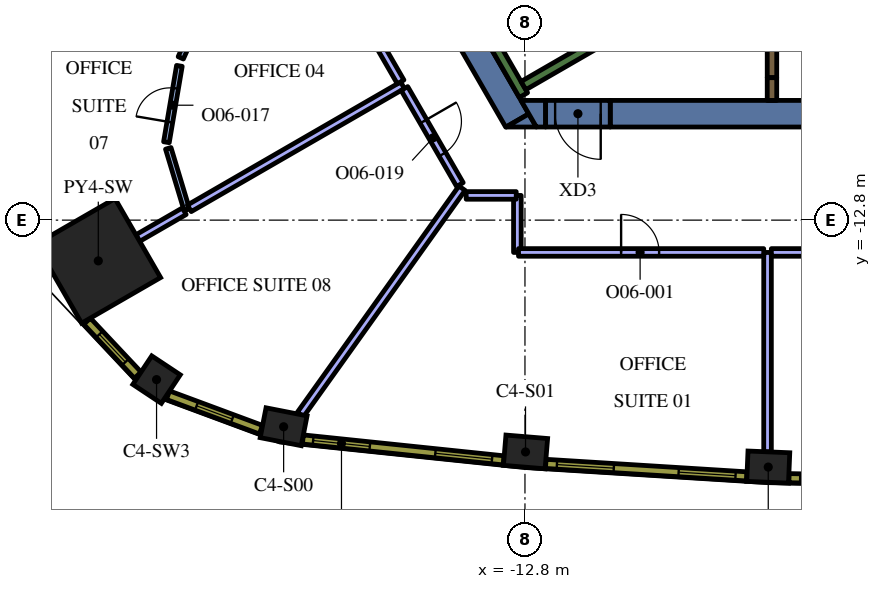
"""IFC4 building model, lengths in metres.
Left out: names, types, materials, properties, quantities, classifications, styles, units other than length and angle.
Written with IfcOpenShell. Run it as: python <this file> out.ifc"""

import sys

from ifc_helpers import new_model, si_unit, direction, frame, frame_2d, origin, origin_2d, place, context, subcontext, project, spatial, polyline, rectangle, outline, extrude, element, fill, save


model = new_model("IFC4")
c1 = context("Model", 3, precision=1e-05, world=origin(), true_north=direction((0.0, 1.0)))
c2 = subcontext(c1, "Body", "Model", "MODEL_VIEW")
j1 = project(units=[si_unit("LENGTHUNIT", "METRE"), si_unit("PLANEANGLEUNIT", "RADIAN")], contexts=[c1])
p1 = place(None, origin())
s1 = spatial("IfcSite", under=j1, at=p1, CompositionType="ELEMENT")
p2 = place(p1, origin())
s2 = spatial("IfcBuilding", under=s1, at=p2, CompositionType="ELEMENT")
p3 = place(p2, frame((0.0, 0.0, 205.8)))
s3 = spatial("IfcBuildingStorey", under=s2, at=p3, CompositionType="ELEMENT", Elevation=205.8)
p4 = place(p3, frame((-24.027, -13.872, 0.0), z_axis=(0.0, 0.0, 1.0), x_axis=(-0.866025403784, -0.5, 0.0)))
e1 = element("IfcColumn", 1, at=p4, inside=s3, PredefinedType="COLUMN", context=c2, shape_type="SweptSolid", body=[
    extrude(rectangle(XDim=2.4, YDim=2.4, at=origin_2d()), origin(), (0.0, 0.0, 1.0), 4.2),
])
for number, where, z_axis, x_axis in (
    (2, (-19.15, -18.237, 0.0), (0.0, 0.0, 1.0), (0.981, -0.192, 0.0)),
    (3, (-12.785, -18.9, 0.0), (0.0, 0.0, 1.0), (0.997, -0.083, 0.0)),
    (4, (-6.398, -19.298, 0.0), (0.0, 0.0, 1.0), (0.999, -0.041, 0.0)),
):
    element("IfcColumn", number, at=place(p3, frame(where, z_axis=z_axis, x_axis=x_axis)), inside=s3, PredefinedType="COLUMN", context=c2, shape_type="SweptSolid", body=[
        extrude(rectangle(XDim=1.1, YDim=0.8, at=origin_2d()), origin(), (0.0, 0.0, 1.0), 4.2),
    ])
p5 = place(p3, frame((-22.494, -16.997, 0.0), z_axis=(0.0, 0.0, 1.0), x_axis=(0.833238868178, -0.552913183563, 0.0)))
e5 = element("IfcColumn", 5, at=p5, inside=s3, PredefinedType="COLUMN", context=c2, shape_type="SweptSolid", body=[
    extrude(rectangle(XDim=0.9, YDim=0.9, at=origin_2d()), origin(), (0.0, 0.0, 1.0), 4.2),
])
p6 = place(p3, frame((-14.917, -6.863, 0.0), z_axis=(0.0, 0.0, 1.0), x_axis=(0.499972675833, -0.866041178825, 0.0)))
e6 = element("IfcWall", 6, at=p6, inside=s3, PredefinedType="SOLIDWALL", context=c2, shape_type="SweptSolid", body=[
    extrude(rectangle(XDim=3.829, YDim=0.7, at=frame_2d((1.915, 0.0))), origin(), (0.0, 0.0, 1.0), 4.2),
])
p7 = place(p3, origin())
e7 = element("IfcWall", 7, at=p7, inside=s3, PredefinedType="SOLIDWALL", context=c2, shape_type="SweptSolid", body=[
    extrude(outline(polyline([(-12.5, -10.35), (-13.296, -10.35), (-12.698, -10.005), (-12.5, -10.35)])), origin(), (0.0, 0.0, 1.0), 4.2),
])
e8 = element("IfcWall", 8, at=p7, inside=s3, PredefinedType="SOLIDWALL", context=c2, shape_type="SweptSolid", body=[
    extrude(outline(polyline([(-12.257, -10.35), (-12.5, -10.35), (-12.904, -9.65), (-12.257, -9.65), (-12.257, -10.35)])), origin(), (0.0, 0.0, 1.0), 4.2),
])
p8 = place(p3, frame((-10.556, -10.0, 0.0), z_axis=(0.0, 0.0, 1.0), x_axis=(1.0, 0.0, 0.0)))
e9 = element("IfcWall", 9, at=p8, inside=s3, PredefinedType="SOLIDWALL", context=c2, shape_type="SweptSolid", body=[
    extrude(rectangle(XDim=19.461, YDim=0.7, at=frame_2d((9.73, 0.0))), origin(), (0.0, 0.0, 1.0), 4.2),
])
p9 = place(p3, frame((-12.84, -9.511, 0.0), z_axis=(0.0, 0.0, 1.0), x_axis=(-0.500048121057, 0.865997619297, 0.0)))
e10 = element("IfcWall", 10, at=p9, inside=s3, PredefinedType="SOLIDWALL", context=c2, shape_type="SweptSolid", body=[
    extrude(rectangle(XDim=3.634, YDim=0.25, at=frame_2d((1.817, 0.0))), origin(), (0.0, 0.0, 1.0), 4.2),
])
p10 = place(p3, frame((-12.84, -9.261, 0.0), z_axis=(0.0, 0.0, 1.0), x_axis=(0.866016039709, 0.500016218704, 0.0)))
e11 = element("IfcWall", 11, at=p10, inside=s3, PredefinedType="SOLIDWALL", context=c2, shape_type="SweptSolid", body=[
    extrude(rectangle(XDim=7.05, YDim=0.25, at=frame_2d((3.525, 0.0))), origin(), (0.0, 0.0, 1.0), 4.2),
])
p11 = place(p3, frame((-6.3, -9.05, 0.0), z_axis=(0.0, 0.0, 1.0), x_axis=(0.0, 1.0, 0.0)))
e12 = element("IfcWall", 12, at=p11, inside=s3, PredefinedType="SOLIDWALL", context=c2, shape_type="SweptSolid", body=[
    extrude(rectangle(XDim=5.23, YDim=0.25, at=frame_2d((2.615, 0.0))), origin(), (0.0, 0.0, 1.0), 4.2),
])
p12 = place(p3, frame((-6.3, -9.052, 0.0), z_axis=(0.0, 0.0, 1.0), x_axis=(0.0, -1.0, 0.0)))
e13 = element("IfcWall", 13, at=p12, inside=s3, PredefinedType="SOLIDWALL", context=c2, shape_type="SweptSolid", body=[
    extrude(rectangle(XDim=0.598, YDim=0.25, at=frame_2d((0.299, 0.0))), origin(), (0.0, 0.0, 1.0), 4.2),
])
p13 = place(p3, frame((-10.556, -10.0, 0.0), z_axis=(0.0, 0.0, 1.0), x_axis=(-1.0, 0.0, 0.0)))
e14 = element("IfcWall", 14, at=p13, inside=s3, PredefinedType="SOLIDWALL", context=c2, shape_type="SweptSolid", body=[
    extrude(rectangle(XDim=1.7, YDim=0.7, at=frame_2d((0.85, 0.0))), origin(), (0.0, 0.0, 1.0), 4.2),
])
p14 = place(p13, frame((0.25, 0.0, 0.0)))
e15 = element("IfcOpeningElement", 15, at=p14, cuts=e14, PredefinedType="OPENING", context=c2, shape_type="SweptSolid", body=[
    extrude(rectangle(XDim=1.2, YDim=2.1, at=frame_2d((0.6, 1.05))), frame((0.0, 0.36, 0.0), z_axis=(0.0, -1.0, 0.0), x_axis=(1.0, 0.0, 0.0)), (0.0, 0.0, 1.0), 0.72),
])
p15 = place(p3, frame((-6.417, -13.65, 0.0), z_axis=(0.0, 0.0, 1.0), x_axis=(0.0, -1.0, 0.0)))
e16 = element("IfcWall", 16, at=p15, inside=s3, PredefinedType="PARTITIONING", context=c2, shape_type="SweptSolid", body=[
    extrude(rectangle(XDim=5.247, YDim=0.2, at=frame_2d((2.624, 0.0))), origin(), (0.0, 0.0, 1.0), 3.45),
])
p16 = place(p3, frame((-18.709, -17.916, 0.0), z_axis=(0.0, 0.0, 1.0), x_axis=(0.581023578026, 0.813886725397, 0.0)))
e17 = element("IfcWall", 17, at=p16, inside=s3, PredefinedType="PARTITIONING", context=c2, shape_type="SweptSolid", body=[
    extrude(rectangle(XDim=7.318, YDim=0.2, at=frame_2d((3.659, 0.0))), origin(), (0.0, 0.0, 1.0), 3.45),
])
p17 = place(p3, frame((-13.0, -12.15, 0.0), z_axis=(0.0, 0.0, 1.0), x_axis=(0.0, -1.0, 0.0)))
e18 = element("IfcWall", 18, at=p17, inside=s3, PredefinedType="PARTITIONING", context=c2, shape_type="SweptSolid", body=[
    extrude(rectangle(XDim=1.5, YDim=0.2, at=frame_2d((0.75, 0.0))), origin(), (0.0, 0.0, 1.0), 3.45),
])
p18 = place(p3, frame((-12.97, -13.65, 0.0), z_axis=(0.0, 0.0, 1.0), x_axis=(1.0, 0.0, 0.0)))
e19 = element("IfcWall", 19, at=p18, inside=s3, PredefinedType="PARTITIONING", context=c2, shape_type="SweptSolid", body=[
    extrude(rectangle(XDim=6.453, YDim=0.2, at=frame_2d((3.227, 0.0))), origin(), (0.0, 0.0, 1.0), 3.45),
])
p19 = place(p18, frame((2.7, 0.0, 0.0)))
e20 = element("IfcOpeningElement", 20, at=p19, cuts=e19, PredefinedType="OPENING", context=c2, shape_type="SweptSolid", body=[
    extrude(rectangle(XDim=1.0, YDim=2.1, at=frame_2d((0.5, 1.05))), frame((0.0, 0.11, 0.0), z_axis=(0.0, -1.0, 0.0), x_axis=(1.0, 0.0, 0.0)), (0.0, 0.0, 1.0), 0.22),
])
p20 = place(p3, frame((-14.347, -12.15, 0.0), z_axis=(0.0, 0.0, 1.0), x_axis=(1.0, 0.0, 0.0)))
e21 = element("IfcWall", 21, at=p20, inside=s3, PredefinedType="PARTITIONING", context=c2, shape_type="SweptSolid", body=[
    extrude(rectangle(XDim=1.317, YDim=0.2, at=frame_2d((0.659, 0.0))), origin(), (0.0, 0.0, 1.0), 3.45),
])
p21 = place(p3, frame((-6.317, -13.65, 0.0), z_axis=(0.0, 0.0, 1.0), x_axis=(1.0, 0.0, 0.0)))
e22 = element("IfcWall", 22, at=p21, inside=s3, PredefinedType="PARTITIONING", context=c2, shape_type="SweptSolid", body=[
    extrude(rectangle(XDim=12.634, YDim=0.2, at=frame_2d((6.317, 0.0))), origin(), (0.0, 0.0, 1.0), 3.45),
])
p22 = place(p21, frame((5.8, 0.0, 0.0)))
e23 = element("IfcOpeningElement", 23, at=p22, cuts=e22, PredefinedType="OPENING", context=c2, shape_type="SweptSolid", body=[
    extrude(rectangle(XDim=1.0, YDim=2.1, at=frame_2d((0.5, 1.05))), frame((0.0, 0.11, 0.0), z_axis=(0.0, -1.0, 0.0), x_axis=(1.0, 0.0, 0.0)), (0.0, 0.0, 1.0), 0.22),
])
p23 = place(p3, frame((-21.157, -6.961, 0.0), z_axis=(0.0, 0.0, 1.0), x_axis=(-0.407627569492, -0.913148270869, 0.0)))
e24 = element("IfcWall", 24, at=p23, inside=s3, PredefinedType="PARTITIONING", context=c2, shape_type="SweptSolid", body=[
    extrude(rectangle(XDim=1.718, YDim=0.15, at=frame_2d((0.859, 0.0))), origin(), (0.0, 0.0, 1.0), 3.45),
])
p24 = place(p3, frame((-22.235, -10.75, 0.0), z_axis=(0.0, 0.0, 1.0), x_axis=(0.167623442148, 0.985851095066, 0.0)))
e25 = element("IfcWall", 25, at=p24, inside=s3, PredefinedType="PARTITIONING", context=c2, shape_type="SweptSolid", body=[
    extrude(rectangle(XDim=2.038, YDim=0.15, at=frame_2d((1.019, 0.0))), origin(), (0.0, 0.0, 1.0), 3.45),
])
p25 = place(p24, frame((0.538, 0.0, 0.0)))
e26 = element("IfcOpeningElement", 26, at=p25, cuts=e25, PredefinedType="OPENING", context=c2, shape_type="SweptSolid", body=[
    extrude(rectangle(XDim=0.9, YDim=2.1, at=frame_2d((0.45, 1.05))), frame((0.0, 0.085, 0.0), z_axis=(0.0, -1.0, 0.0), x_axis=(1.0, 0.0, 0.0)), (0.0, 0.0, 1.0), 0.17),
])
p26 = place(p3, frame((-22.186, -10.911, 0.0), z_axis=(0.0, 0.0, 1.0), x_axis=(0.288899576463, -0.957359407286, 0.0)))
e27 = element("IfcWall", 27, at=p26, inside=s3, PredefinedType="PARTITIONING", context=c2, shape_type="SweptSolid", body=[
    extrude(rectangle(XDim=1.688, YDim=0.15, at=frame_2d((0.844, 0.0))), origin(), (0.0, 0.0, 1.0), 3.45),
])
p27 = place(p3, frame((-21.765, -12.566, 0.0), z_axis=(0.0, 0.0, 1.0), x_axis=(-0.866021473228, -0.500006807861, 0.0)))
e28 = element("IfcWall", 28, at=p27, inside=s3, PredefinedType="PARTITIONING", context=c2, shape_type="SweptSolid", body=[
    extrude(rectangle(XDim=1.412, YDim=0.2, at=frame_2d((0.706, 0.0))), origin(), (0.0, 0.0, 1.0), 3.45),
])
p28 = place(p3, frame((-16.021, -9.25, 0.0), z_axis=(0.0, 0.0, 1.0), x_axis=(-0.86601739438, -0.500013872438, 0.0)))
e29 = element("IfcWall", 29, at=p28, inside=s3, PredefinedType="PARTITIONING", context=c2, shape_type="SweptSolid", body=[
    extrude(rectangle(XDim=6.478, YDim=0.2, at=frame_2d((3.239, 0.0))), origin(), (0.0, 0.0, 1.0), 3.45),
])
p29 = place(p3, frame((-17.681, -6.376, 0.0), z_axis=(0.0, 0.0, 1.0), x_axis=(0.500022299258, -0.866012528919, 0.0)))
e30 = element("IfcWall", 30, at=p29, inside=s3, PredefinedType="PARTITIONING", context=c2, shape_type="SweptSolid", body=[
    extrude(rectangle(XDim=3.219, YDim=0.2, at=frame_2d((1.609, 0.0))), origin(), (0.0, 0.0, 1.0), 3.45),
])
p30 = place(p3, frame((-15.971, -9.337, 0.0), z_axis=(0.0, 0.0, 1.0), x_axis=(0.500007233661, -0.866021227388, 0.0)))
e31 = element("IfcWall", 31, at=p30, inside=s3, PredefinedType="PARTITIONING", context=c2, shape_type="SweptSolid", body=[
    extrude(rectangle(XDim=2.919, YDim=0.2, at=frame_2d((1.459, 0.0))), origin(), (0.0, 0.0, 1.0), 3.45),
])
p31 = place(p30, frame((1.0, 0.0, 0.0)))
e32 = element("IfcOpeningElement", 32, at=p31, cuts=e31, PredefinedType="OPENING", context=c2, shape_type="SweptSolid", body=[
    extrude(rectangle(XDim=1.0, YDim=2.1, at=frame_2d((0.5, 1.05))), frame((0.0, 0.11, 0.0), z_axis=(0.0, -1.0, 0.0), x_axis=(1.0, 0.0, 0.0)), (0.0, 0.0, 1.0), 0.22),
])
p32 = place(p3, frame((-18.644, -18.571, 0.0), z_axis=(0.0, 0.0, 1.0), x_axis=(0.994621961215, -0.103571976272, 0.0)))
e33 = element("IfcWall", 33, at=p32, inside=s3, PredefinedType="SOLIDWALL", context=c2, shape_type="SweptSolid", body=[
    extrude(rectangle(XDim=5.311, YDim=0.24, at=frame_2d((2.655, 0.0))), origin(), (0.0, 0.0, 1.0), 3.95),
])
p33 = place(p32, frame((0.271, 0.0, 0.9)))
e34 = element("IfcOpeningElement", 34, at=p33, cuts=e33, PredefinedType="OPENING", context=c2, shape_type="SweptSolid", body=[
    extrude(rectangle(XDim=1.5, YDim=2.55, at=frame_2d((0.75, 1.275))), frame((0.0, 0.13, 0.0), z_axis=(0.0, -1.0, 0.0), x_axis=(1.0, 0.0, 0.0)), (0.0, 0.0, 1.0), 0.26),
])
p34 = place(p32, frame((3.504, 0.0, 0.9)))
e35 = element("IfcOpeningElement", 35, at=p34, cuts=e33, PredefinedType="OPENING", context=c2, shape_type="SweptSolid", body=[
    extrude(rectangle(XDim=1.5, YDim=2.55, at=frame_2d((0.75, 1.275))), frame((0.0, 0.13, 0.0), z_axis=(0.0, -1.0, 0.0), x_axis=(1.0, 0.0, 0.0)), (0.0, 0.0, 1.0), 0.26),
])
p35 = place(p3, frame((-12.253, -19.213, 0.0), z_axis=(0.0, 0.0, 1.0), x_axis=(0.9980633213, -0.062206162685, 0.0)))
e36 = element("IfcWall", 36, at=p35, inside=s3, PredefinedType="SOLIDWALL", context=c2, shape_type="SweptSolid", body=[
    extrude(rectangle(XDim=5.298, YDim=0.24, at=frame_2d((2.649, 0.0))), origin(), (0.0, 0.0, 1.0), 3.95),
])
p36 = place(p35, frame((0.294, 0.0, 0.9)))
e37 = element("IfcOpeningElement", 37, at=p36, cuts=e36, PredefinedType="OPENING", context=c2, shape_type="SweptSolid", body=[
    extrude(rectangle(XDim=1.5, YDim=2.55, at=frame_2d((0.75, 1.275))), frame((0.0, 0.13, 0.0), z_axis=(0.0, -1.0, 0.0), x_axis=(1.0, 0.0, 0.0)), (0.0, 0.0, 1.0), 0.26),
])
p37 = place(p35, frame((3.504, 0.0, 0.9)))
e38 = element("IfcOpeningElement", 38, at=p37, cuts=e36, PredefinedType="OPENING", context=c2, shape_type="SweptSolid", body=[
    extrude(rectangle(XDim=1.5, YDim=2.55, at=frame_2d((0.75, 1.275))), frame((0.0, 0.13, 0.0), z_axis=(0.0, -1.0, 0.0), x_axis=(1.0, 0.0, 0.0)), (0.0, 0.0, 1.0), 0.26),
])
p38 = place(p3, frame((-5.854, -19.589, 0.0), z_axis=(0.0, 0.0, 1.0), x_axis=(0.999784035184, -0.020781794712, 0.0)))
e39 = element("IfcWall", 39, at=p38, inside=s3, PredefinedType="SOLIDWALL", context=c2, shape_type="SweptSolid", body=[
    extrude(rectangle(XDim=5.298, YDim=0.24, at=frame_2d((2.649, 0.0))), origin(), (0.0, 0.0, 1.0), 3.95),
])
p39 = place(p38, frame((0.294, 0.0, 0.9)))
e40 = element("IfcOpeningElement", 40, at=p39, cuts=e39, PredefinedType="OPENING", context=c2, shape_type="SweptSolid", body=[
    extrude(rectangle(XDim=1.5, YDim=2.55, at=frame_2d((0.75, 1.275))), frame((0.0, 0.13, 0.0), z_axis=(0.0, -1.0, 0.0), x_axis=(1.0, 0.0, 0.0)), (0.0, 0.0, 1.0), 0.26),
])
p40 = place(p38, frame((3.504, 0.0, 0.9)))
e41 = element("IfcOpeningElement", 41, at=p40, cuts=e39, PredefinedType="OPENING", context=c2, shape_type="SweptSolid", body=[
    extrude(rectangle(XDim=1.5, YDim=2.55, at=frame_2d((0.75, 1.275))), frame((0.0, 0.13, 0.0), z_axis=(0.0, -1.0, 0.0), x_axis=(1.0, 0.0, 0.0)), (0.0, 0.0, 1.0), 0.26),
])
p41 = place(p3, frame((-24.323, -15.459, 0.0), z_axis=(0.0, 0.0, 1.0), x_axis=(0.684770274166, -0.728758994194, 0.0)))
e42 = element("IfcWall", 42, at=p41, inside=s3, PredefinedType="SOLIDWALL", context=c2, shape_type="SweptSolid", body=[
    extrude(rectangle(XDim=1.948, YDim=0.24, at=frame_2d((0.974, 0.0))), origin(), (0.0, 0.0, 1.0), 3.95),
])
p42 = place(p41, frame((0.474, 0.0, 0.9)))
e43 = element("IfcOpeningElement", 43, at=p42, cuts=e42, PredefinedType="OPENING", context=c2, shape_type="SweptSolid", body=[
    extrude(rectangle(XDim=1.0, YDim=2.55, at=frame_2d((0.5, 1.275))), frame((0.0, 0.13, 0.0), z_axis=(0.0, -1.0, 0.0), x_axis=(1.0, 0.0, 0.0)), (0.0, 0.0, 1.0), 0.26),
])
p43 = place(p3, frame((-22.194, -17.406, 0.0), z_axis=(0.0, 0.0, 1.0), x_axis=(0.937569171184, -0.347798863203, 0.0)))
e44 = element("IfcWall", 44, at=p43, inside=s3, PredefinedType="SOLIDWALL", context=c2, shape_type="SweptSolid", body=[
    extrude(rectangle(XDim=2.609, YDim=0.24, at=frame_2d((1.305, 0.0))), origin(), (0.0, 0.0, 1.0), 3.95),
])
p44 = place(p43, frame((0.805, 0.0, 0.9)))
e45 = element("IfcOpeningElement", 45, at=p44, cuts=e44, PredefinedType="OPENING", context=c2, shape_type="SweptSolid", body=[
    extrude(rectangle(XDim=1.0, YDim=2.55, at=frame_2d((0.5, 1.275))), frame((0.0, 0.13, 0.0), z_axis=(0.0, -1.0, 0.0), x_axis=(1.0, 0.0, 0.0)), (0.0, 0.0, 1.0), 0.26),
])
p45 = place(p14, origin())
e46 = element("IfcDoor", 46, at=p45, inside=s3, OperationType="SINGLE_SWING_LEFT", PredefinedType="DOOR", context=c2, shape_type="SweptSolid", body=[
    extrude(rectangle(XDim=1.2, YDim=2.1, at=frame_2d((0.6, 1.05))), frame((0.0, 0.025, 0.0), z_axis=(0.0, -1.0, 0.0), x_axis=(1.0, 0.0, 0.0)), (0.0, 0.0, 1.0), 0.05),
])
fill(e15, e46)
p46 = place(p19, origin())
e47 = element("IfcDoor", 47, at=p46, inside=s3, OperationType="SINGLE_SWING_LEFT", PredefinedType="DOOR", context=c2, shape_type="SweptSolid", body=[
    extrude(rectangle(XDim=1.0, YDim=2.1, at=frame_2d((0.5, 1.05))), frame((0.0, 0.025, 0.0), z_axis=(0.0, -1.0, 0.0), x_axis=(1.0, 0.0, 0.0)), (0.0, 0.0, 1.0), 0.05),
])
fill(e20, e47)
p47 = place(p25, origin())
e48 = element("IfcDoor", 48, at=p47, inside=s3, OperationType="SINGLE_SWING_LEFT", PredefinedType="DOOR", context=c2, shape_type="SweptSolid", body=[
    extrude(rectangle(XDim=0.9, YDim=2.1, at=frame_2d((0.45, 1.05))), frame((0.0, 0.025, 0.0), z_axis=(0.0, -1.0, 0.0), x_axis=(1.0, 0.0, 0.0)), (0.0, 0.0, 1.0), 0.05),
])
fill(e26, e48)
p48 = place(p31, origin())
e49 = element("IfcDoor", 49, at=p48, inside=s3, OperationType="SINGLE_SWING_RIGHT", PredefinedType="DOOR", context=c2, shape_type="SweptSolid", body=[
    extrude(rectangle(XDim=1.0, YDim=2.1, at=frame_2d((0.5, 1.05))), frame((0.0, 0.025, 0.0), z_axis=(0.0, -1.0, 0.0), x_axis=(1.0, 0.0, 0.0)), (0.0, 0.0, 1.0), 0.05),
])
fill(e32, e49)
p49 = place(p33, origin())
e50 = element("IfcWindow", 50, at=p49, inside=s3, PartitioningType="SINGLE_PANEL", PredefinedType="WINDOW", context=c2, shape_type="SweptSolid", body=[
    extrude(rectangle(XDim=1.5, YDim=2.55, at=frame_2d((0.75, 1.275))), frame((0.0, 0.04, 0.0), z_axis=(0.0, -1.0, 0.0), x_axis=(1.0, 0.0, 0.0)), (0.0, 0.0, 1.0), 0.06),
])
fill(e34, e50)
p50 = place(p34, origin())
e51 = element("IfcWindow", 51, at=p50, inside=s3, PartitioningType="SINGLE_PANEL", PredefinedType="WINDOW", context=c2, shape_type="SweptSolid", body=[
    extrude(rectangle(XDim=1.5, YDim=2.55, at=frame_2d((0.75, 1.275))), frame((0.0, 0.04, 0.0), z_axis=(0.0, -1.0, 0.0), x_axis=(1.0, 0.0, 0.0)), (0.0, 0.0, 1.0), 0.06),
])
fill(e35, e51)
p51 = place(p36, origin())
e52 = element("IfcWindow", 52, at=p51, inside=s3, PartitioningType="SINGLE_PANEL", PredefinedType="WINDOW", context=c2, shape_type="SweptSolid", body=[
    extrude(rectangle(XDim=1.5, YDim=2.55, at=frame_2d((0.75, 1.275))), frame((0.0, 0.04, 0.0), z_axis=(0.0, -1.0, 0.0), x_axis=(1.0, 0.0, 0.0)), (0.0, 0.0, 1.0), 0.06),
])
fill(e37, e52)
p52 = place(p37, origin())
e53 = element("IfcWindow", 53, at=p52, inside=s3, PartitioningType="SINGLE_PANEL", PredefinedType="WINDOW", context=c2, shape_type="SweptSolid", body=[
    extrude(rectangle(XDim=1.5, YDim=2.55, at=frame_2d((0.75, 1.275))), frame((0.0, 0.04, 0.0), z_axis=(0.0, -1.0, 0.0), x_axis=(1.0, 0.0, 0.0)), (0.0, 0.0, 1.0), 0.06),
])
fill(e38, e53)
p53 = place(p39, origin())
e54 = element("IfcWindow", 54, at=p53, inside=s3, PartitioningType="SINGLE_PANEL", PredefinedType="WINDOW", context=c2, shape_type="SweptSolid", body=[
    extrude(rectangle(XDim=1.5, YDim=2.55, at=frame_2d((0.75, 1.275))), frame((0.0, 0.04, 0.0), z_axis=(0.0, -1.0, 0.0), x_axis=(1.0, 0.0, 0.0)), (0.0, 0.0, 1.0), 0.06),
])
fill(e40, e54)
p54 = place(p42, origin())
e55 = element("IfcWindow", 55, at=p54, inside=s3, PartitioningType="SINGLE_PANEL", PredefinedType="WINDOW", context=c2, shape_type="SweptSolid", body=[
    extrude(rectangle(XDim=1.0, YDim=2.55, at=frame_2d((0.5, 1.275))), frame((0.0, 0.04, 0.0), z_axis=(0.0, -1.0, 0.0), x_axis=(1.0, 0.0, 0.0)), (0.0, 0.0, 1.0), 0.06),
])
fill(e43, e55)
p55 = place(p44, origin())
e56 = element("IfcWindow", 56, at=p55, inside=s3, PartitioningType="SINGLE_PANEL", PredefinedType="WINDOW", context=c2, shape_type="SweptSolid", body=[
    extrude(rectangle(XDim=1.0, YDim=2.55, at=frame_2d((0.5, 1.275))), frame((0.0, 0.04, 0.0), z_axis=(0.0, -1.0, 0.0), x_axis=(1.0, 0.0, 0.0)), (0.0, 0.0, 1.0), 0.06),
])
fill(e45, e56)
save(model, sys.argv[1])
